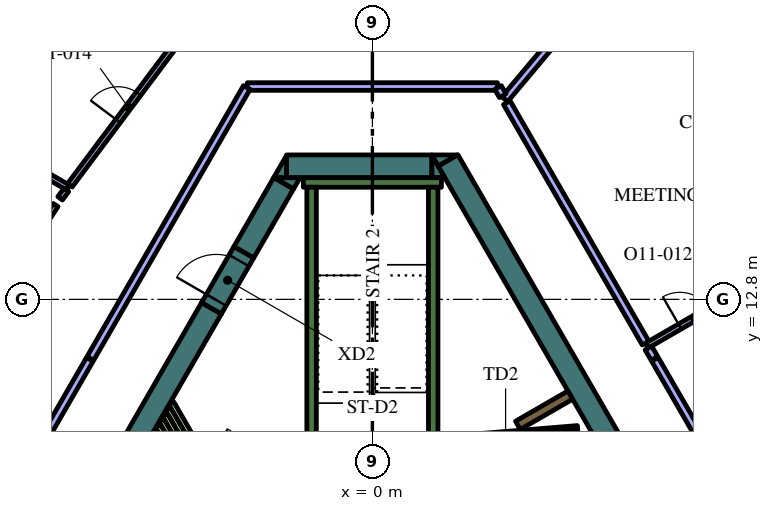
"""IFC4 building model, lengths in metres.
Left out: names, types, materials, properties, quantities, classifications, styles, units other than length and angle.
Written with IfcOpenShell. Run it as: python <this file> out.ifc"""

import sys

from ifc_helpers import new_model, si_unit, direction, frame, frame_2d, origin, place, context, subcontext, project, spatial, polyline, rectangle, outline, extrude, element, fill, save


model = new_model("IFC4")
c1 = context("Model", 3, precision=1e-05, world=origin(), true_north=direction((0.0, 1.0)))
c2 = subcontext(c1, "Body", "Model", "MODEL_VIEW")
j1 = project(units=[si_unit("LENGTHUNIT", "METRE"), si_unit("PLANEANGLEUNIT", "RADIAN")], contexts=[c1])
p1 = place(None, origin())
s1 = spatial("IfcSite", under=j1, at=p1, CompositionType="ELEMENT")
p2 = place(p1, origin())
s2 = spatial("IfcBuilding", under=s1, at=p2, CompositionType="ELEMENT")
p3 = place(p2, frame((0.0, 0.0, 275.4)))
s3 = spatial("IfcBuildingStorey", under=s2, at=p3, CompositionType="ELEMENT", Elevation=275.4)
p4 = place(p3, frame((1.989, 16.456, 0.0), z_axis=(0.0, 0.0, 1.0), x_axis=(0.49999102663, -0.8660305845, 0.0)))
e1 = element("IfcWall", 1, at=p4, inside=s3, PredefinedType="SOLIDWALL", context=c2, shape_type="SweptSolid", body=[
    extrude(rectangle(XDim=12.406, YDim=0.6, at=frame_2d((6.203, 0.0))), origin(), (0.0, 0.0, 1.0), 4.2),
])
p5 = place(p3, origin())
e2 = element("IfcWall", 2, at=p5, inside=s3, PredefinedType="SOLIDWALL", context=c2, shape_type="SweptSolid", body=[
    extrude(outline(polyline([(1.559, 16.6), (2.235, 16.6), (1.728, 16.307), (1.559, 16.6)])), origin(), (0.0, 0.0, 1.0), 4.2),
])
p6 = place(p3, frame((-2.258, 16.3, 0.0), z_axis=(0.0, 0.0, 1.0), x_axis=(1.0, 0.0, 0.0)))
e3 = element("IfcWall", 3, at=p6, inside=s3, PredefinedType="SOLIDWALL", context=c2, shape_type="SweptSolid", body=[
    extrude(rectangle(XDim=3.823, YDim=0.6, at=frame_2d((1.912, 0.0))), origin(), (0.0, 0.0, 1.0), 4.2),
])
e4 = element("IfcWall", 4, at=p5, inside=s3, PredefinedType="SOLIDWALL", context=c2, shape_type="SweptSolid", body=[
    extrude(outline(polyline([(1.905, 16.0), (1.567, 16.0), (1.567, 16.585), (1.905, 16.0)])), origin(), (0.0, 0.0, 1.0), 4.2),
])
e5 = element("IfcWall", 5, at=p5, inside=s3, PredefinedType="SOLIDWALL", context=c2, shape_type="SweptSolid", body=[
    extrude(outline(polyline([(-2.598, 16.0), (-2.26, 16.585), (-2.26, 16.0), (-2.598, 16.0)])), origin(), (0.0, 0.0, 1.0), 4.2),
])
p7 = place(p3, frame((-2.335, 15.855, 0.0), z_axis=(0.0, 0.0, 1.0), x_axis=(-0.499980971027, -0.866036389889, 0.0)))
e6 = element("IfcWall", 6, at=p7, inside=s3, PredefinedType="SOLIDWALL", context=c2, shape_type="SweptSolid", body=[
    extrude(rectangle(XDim=2.098, YDim=0.6, at=frame_2d((1.049, 0.0))), origin(), (0.0, 0.0, 1.0), 4.2),
])
e7 = element("IfcWall", 7, at=p5, inside=s3, PredefinedType="SOLIDWALL", context=c2, shape_type="SweptSolid", body=[
    extrude(outline(polyline([(-1.905, 16.0), (-2.074, 15.707), (-2.581, 16.0), (-1.905, 16.0)])), origin(), (0.0, 0.0, 1.0), 4.2),
])
p8 = place(p3, frame((-4.234, 12.566, 0.0), z_axis=(0.0, 0.0, 1.0), x_axis=(-0.499998841866, -0.866026072432, 0.0)))
e8 = element("IfcWall", 8, at=p8, inside=s3, PredefinedType="SOLIDWALL", context=c2, shape_type="SweptSolid", body=[
    extrude(rectangle(XDim=16.694, YDim=0.6, at=frame_2d((8.347, 0.0))), origin(), (0.0, 0.0, 1.0), 4.2),
])
p9 = place(p3, frame((-1.817, 15.875, 0.0), z_axis=(0.0, 0.0, 1.0), x_axis=(1.0, 0.0, 0.0)))
e9 = element("IfcWall", 9, at=p9, inside=s3, PredefinedType="SOLIDWALL", context=c2, shape_type="SweptSolid", body=[
    extrude(rectangle(XDim=3.634, YDim=0.25, at=frame_2d((1.817, 0.0))), origin(), (0.0, 0.0, 1.0), 4.2),
])
p10 = place(p3, frame((1.6, 8.95, 0.0), z_axis=(0.0, 0.0, 1.0), x_axis=(0.0, 1.0, 0.0)))
e10 = element("IfcWall", 10, at=p10, inside=s3, PredefinedType="SOLIDWALL", context=c2, shape_type="SweptSolid", body=[
    extrude(rectangle(XDim=6.8, YDim=0.25, at=frame_2d((3.4, 0.0))), origin(), (0.0, 0.0, 1.0), 4.2),
])
p11 = place(p3, frame((-1.6, 8.7, 0.0), z_axis=(0.0, 0.0, 1.0), x_axis=(0.0, 1.0, 0.0)))
e11 = element("IfcWall", 11, at=p11, inside=s3, PredefinedType="SOLIDWALL", context=c2, shape_type="SweptSolid", body=[
    extrude(rectangle(XDim=7.05, YDim=0.25, at=frame_2d((3.525, 0.0))), origin(), (0.0, 0.0, 1.0), 4.2),
])
p12 = place(p3, frame((3.83, 9.486, 0.0), z_axis=(0.0, 0.0, 1.0), x_axis=(0.865986202621, 0.500067892261, 0.0)))
e12 = element("IfcWall", 12, at=p12, inside=s3, PredefinedType="SOLIDWALL", context=c2, shape_type="SweptSolid", body=[
    extrude(rectangle(XDim=1.591, YDim=0.25, at=frame_2d((0.795, 0.0))), origin(), (0.0, 0.0, 1.0), 4.2),
])
p13 = place(p3, frame((-5.294, 10.067, 0.0), z_axis=(0.0, 0.0, 1.0), x_axis=(0.500054140411, -0.865994143547, 0.0)))
e13 = element("IfcWall", 13, at=p13, inside=s3, PredefinedType="PARTITIONING", context=c2, shape_type="SweptSolid", body=[
    extrude(rectangle(XDim=1.529, YDim=0.15, at=frame_2d((0.765, 0.0))), origin(), (0.0, 0.0, 1.0), 3.55),
])
p14 = place(p3, frame((-5.381, 9.917, 0.0), z_axis=(0.0, 0.0, 1.0), x_axis=(0.500136970483, -0.865946309396, 0.0)))
e14 = element("IfcWall", 14, at=p14, inside=s3, PredefinedType="PARTITIONING", context=c2, shape_type="SweptSolid", body=[
    extrude(rectangle(XDim=1.359, YDim=0.15, at=frame_2d((0.68, 0.0))), origin(), (0.0, 0.0, 1.0), 3.55),
])
p15 = place(p3, frame((-5.467, 9.767, 0.0), z_axis=(0.0, 0.0, 1.0), x_axis=(0.500168849293, -0.86592789665, 0.0)))
e15 = element("IfcWall", 15, at=p15, inside=s3, PredefinedType="PARTITIONING", context=c2, shape_type="SweptSolid", body=[
    extrude(rectangle(XDim=1.01, YDim=0.15, at=frame_2d((0.505, 0.0))), origin(), (0.0, 0.0, 1.0), 3.55),
])
p16 = place(p3, frame((-5.554, 9.617, 0.0), z_axis=(0.0, 0.0, 1.0), x_axis=(0.500253084543, -0.86587923604, 0.0)))
e16 = element("IfcWall", 16, at=p16, inside=s3, PredefinedType="PARTITIONING", context=c2, shape_type="SweptSolid", body=[
    extrude(rectangle(XDim=0.664, YDim=0.15, at=frame_2d((0.332, 0.0))), origin(), (0.0, 0.0, 1.0), 3.55),
])
p17 = place(p3, frame((-5.64, 9.467, 0.0), z_axis=(0.0, 0.0, 1.0), x_axis=(0.499944387978, -0.86605750902, 0.0)))
e17 = element("IfcWall", 17, at=p17, inside=s3, PredefinedType="PARTITIONING", context=c2, shape_type="SweptSolid", body=[
    extrude(rectangle(XDim=0.317, YDim=0.15, at=frame_2d((0.159, 0.0))), origin(), (0.0, 0.0, 1.0), 3.55),
])
p18 = place(p3, frame((5.398, 9.419, 0.0), z_axis=(0.0, 0.0, 1.0), x_axis=(-0.996653416376, -0.081743303248, 0.0)))
e18 = element("IfcWall", 18, at=p18, inside=s3, PredefinedType="PARTITIONING", context=c2, shape_type="SweptSolid", body=[
    extrude(rectangle(XDim=2.7, YDim=0.12, at=frame_2d((1.35, 0.0))), origin(), (0.0, 0.0, 1.0), 3.55),
])
p19 = place(p18, frame((1.45, 0.0, 0.0)))
e19 = element("IfcOpeningElement", 19, at=p19, cuts=e18, PredefinedType="OPENING", context=c2, shape_type="SweptSolid", body=[
    extrude(rectangle(XDim=0.9, YDim=2.1, at=frame_2d((0.45, 1.05))), frame((0.0, 0.07, 0.0), z_axis=(0.0, -1.0, 0.0), x_axis=(1.0, 0.0, 0.0)), (0.0, 0.0, 1.0), 0.14),
])
p20 = place(p3, frame((-4.234, 12.566, 0.0), z_axis=(0.0, 0.0, 1.0), x_axis=(0.500000056704, 0.866025371046, 0.0)))
e20 = element("IfcWall", 20, at=p20, inside=s3, PredefinedType="SOLIDWALL", context=c2, shape_type="SweptSolid", body=[
    extrude(rectangle(XDim=1.7, YDim=0.6, at=frame_2d((0.85, 0.0))), origin(), (0.0, 0.0, 1.0), 4.2),
])
p21 = place(p20, frame((0.25, 0.0, 0.0)))
e21 = element("IfcOpeningElement", 21, at=p21, cuts=e20, PredefinedType="OPENING", context=c2, shape_type="SweptSolid", body=[
    extrude(rectangle(XDim=1.2, YDim=2.1, at=frame_2d((0.6, 1.05))), frame((0.0, 0.31, 0.0), z_axis=(0.0, -1.0, 0.0), x_axis=(1.0, 0.0, 0.0)), (0.0, 0.0, 1.0), 0.62),
])
p22 = place(p3, frame((7.226, 11.585, 0.0), z_axis=(0.0, 0.0, 1.0), x_axis=(0.866021079084, 0.500007490527, 0.0)))
e22 = element("IfcWall", 22, at=p22, inside=s3, PredefinedType="PARTITIONING", context=c2, shape_type="SweptSolid", body=[
    extrude(rectangle(XDim=2.892, YDim=0.15, at=frame_2d((1.446, 0.0))), origin(), (0.0, 0.0, 1.0), 3.55),
])
p23 = place(p22, frame((1.0, 0.0, 0.0)))
e23 = element("IfcOpeningElement", 23, at=p23, cuts=e22, PredefinedType="OPENING", context=c2, shape_type="SweptSolid", body=[
    extrude(rectangle(XDim=0.9, YDim=2.1, at=frame_2d((0.45, 1.05))), frame((0.0, 0.085, 0.0), z_axis=(0.0, -1.0, 0.0), x_axis=(1.0, 0.0, 0.0)), (0.0, 0.0, 1.0), 0.17),
])
p24 = place(p3, frame((13.436, 0.829, 0.0), z_axis=(0.0, 0.0, 1.0), x_axis=(-0.49999894854, 0.866026010844, 0.0)))
e24 = element("IfcWall", 24, at=p24, inside=s3, PredefinedType="PARTITIONING", context=c2, shape_type="SweptSolid", body=[
    extrude(rectangle(XDim=12.0, YDim=0.2, at=frame_2d((6.0, 0.0))), origin(), (0.0, 0.0, 1.0), 3.55),
])
p25 = place(p24, frame((5.5, 0.0, 0.0)))
e25 = element("IfcOpeningElement", 25, at=p25, cuts=e24, PredefinedType="OPENING", context=c2, shape_type="SweptSolid", body=[
    extrude(rectangle(XDim=1.0, YDim=2.1, at=frame_2d((0.5, 1.05))), frame((0.0, 0.11, 0.0), z_axis=(0.0, -1.0, 0.0), x_axis=(1.0, 0.0, 0.0)), (0.0, 0.0, 1.0), 0.22),
])
p26 = place(p3, frame((7.421, 11.247, 0.0), z_axis=(0.0, 0.0, 1.0), x_axis=(-0.500303403544, 0.865850162789, 0.0)))
e26 = element("IfcWall", 26, at=p26, inside=s3, PredefinedType="PARTITIONING", context=c2, shape_type="SweptSolid", body=[
    extrude(rectangle(XDim=0.315, YDim=0.2, at=frame_2d((0.158, 0.0))), origin(), (0.0, 0.0, 1.0), 3.55),
])
p27 = place(p3, frame((3.483, 18.067, 0.0), z_axis=(0.0, 0.0, 1.0), x_axis=(0.642896944312, 0.765952687177, 0.0)))
e27 = element("IfcWall", 27, at=p27, inside=s3, PredefinedType="PARTITIONING", context=c2, shape_type="SweptSolid", body=[
    extrude(rectangle(XDim=2.29, YDim=0.2, at=frame_2d((1.145, 0.0))), origin(), (0.0, 0.0, 1.0), 3.55),
])
p28 = place(p3, frame((7.188, 11.65, 0.0), z_axis=(0.0, 0.0, 1.0), x_axis=(-0.499989634868, 0.866031388014, 0.0)))
e28 = element("IfcWall", 28, at=p28, inside=s3, PredefinedType="PARTITIONING", context=c2, shape_type="SweptSolid", body=[
    extrude(rectangle(XDim=7.303, YDim=0.2, at=frame_2d((3.652, 0.0))), origin(), (0.0, 0.0, 1.0), 3.55),
])
p29 = place(p3, frame((-8.007, 15.74, 0.0), z_axis=(0.0, 0.0, 1.0), x_axis=(-0.866044607523, 0.499966736674, 0.0)))
e29 = element("IfcWall", 29, at=p29, inside=s3, PredefinedType="PARTITIONING", context=c2, shape_type="SweptSolid", body=[
    extrude(rectangle(XDim=3.115, YDim=0.15, at=frame_2d((1.557, 0.0))), origin(), (0.0, 0.0, 1.0), 3.55),
])
p30 = place(p3, frame((-7.962, 15.8, 0.0), z_axis=(0.0, 0.0, 1.0), x_axis=(0.599528135832, 0.800353680785, 0.0)))
e30 = element("IfcWall", 30, at=p30, inside=s3, PredefinedType="PARTITIONING", context=c2, shape_type="SweptSolid", body=[
    extrude(rectangle(XDim=5.217, YDim=0.15, at=frame_2d((2.608, 0.0))), origin(), (0.0, 0.0, 1.0), 3.55),
])
p31 = place(p30, frame((2.116, 0.0, 0.0)))
e31 = element("IfcOpeningElement", 31, at=p31, cuts=e30, PredefinedType="OPENING", context=c2, shape_type="SweptSolid", body=[
    extrude(rectangle(XDim=0.9, YDim=2.1, at=frame_2d((0.45, 1.05))), frame((0.0, 0.085, 0.0), z_axis=(0.0, -1.0, 0.0), x_axis=(1.0, 0.0, 0.0)), (0.0, 0.0, 1.0), 0.17),
])
p32 = place(p3, frame((-8.052, 15.679, 0.0), z_axis=(0.0, 0.0, 1.0), x_axis=(-0.599004157744, -0.800745914136, 0.0)))
e32 = element("IfcWall", 32, at=p32, inside=s3, PredefinedType="PARTITIONING", context=c2, shape_type="SweptSolid", body=[
    extrude(rectangle(XDim=0.275, YDim=0.15, at=frame_2d((0.137, 0.0))), origin(), (0.0, 0.0, 1.0), 3.55),
])
p33 = place(p3, frame((-11.628, 10.29, 0.0), z_axis=(0.0, 0.0, 1.0), x_axis=(0.55074607557, 0.834672846236, 0.0)))
e33 = element("IfcWall", 33, at=p33, inside=s3, PredefinedType="PARTITIONING", context=c2, shape_type="SweptSolid", body=[
    extrude(rectangle(XDim=5.979, YDim=0.15, at=frame_2d((2.99, 0.0))), origin(), (0.0, 0.0, 1.0), 3.55),
])
p34 = place(p33, frame((2.58, 0.0, 0.0)))
e34 = element("IfcOpeningElement", 34, at=p34, cuts=e33, PredefinedType="OPENING", context=c2, shape_type="SweptSolid", body=[
    extrude(rectangle(XDim=0.9, YDim=2.1, at=frame_2d((0.45, 1.05))), frame((0.0, 0.085, 0.0), z_axis=(0.0, -1.0, 0.0), x_axis=(1.0, 0.0, 0.0)), (0.0, 0.0, 1.0), 0.17),
])
p35 = place(p3, frame((-7.436, 11.221, 0.0), z_axis=(0.0, 0.0, 1.0), x_axis=(-0.49999894854, -0.866026010844, 0.0)))
e35 = element("IfcWall", 35, at=p35, inside=s3, PredefinedType="PARTITIONING", context=c2, shape_type="SweptSolid", body=[
    extrude(rectangle(XDim=12.0, YDim=0.2, at=frame_2d((6.0, 0.0))), origin(), (0.0, 0.0, 1.0), 3.55),
])
p36 = place(p35, frame((5.5, 0.0, 0.0)))
e36 = element("IfcOpeningElement", 36, at=p36, cuts=e35, PredefinedType="OPENING", context=c2, shape_type="SweptSolid", body=[
    extrude(rectangle(XDim=1.0, YDim=2.1, at=frame_2d((0.5, 1.05))), frame((0.0, 0.11, 0.0), z_axis=(0.0, -1.0, 0.0), x_axis=(1.0, 0.0, 0.0)), (0.0, 0.0, 1.0), 0.22),
])
p37 = place(p3, frame((3.291, 18.4, 0.0), z_axis=(0.0, 0.0, 1.0), x_axis=(-1.0, 0.0, 0.0)))
e37 = element("IfcWall", 37, at=p37, inside=s3, PredefinedType="PARTITIONING", context=c2, shape_type="SweptSolid", body=[
    extrude(rectangle(XDim=6.582, YDim=0.2, at=frame_2d((3.291, 0.0))), origin(), (0.0, 0.0, 1.0), 3.55),
])
p38 = place(p3, frame((-3.306, 18.374, 0.0), z_axis=(0.0, 0.0, 1.0), x_axis=(-0.499999798456, -0.866025520146, 0.0)))
e38 = element("IfcWall", 38, at=p38, inside=s3, PredefinedType="PARTITIONING", context=c2, shape_type="SweptSolid", body=[
    extrude(rectangle(XDim=8.229, YDim=0.2, at=frame_2d((4.115, 0.0))), origin(), (0.0, 0.0, 1.0), 3.55),
])
p39 = place(p3, frame((3.43, 18.159, 0.0), z_axis=(0.0, 0.0, 1.0), x_axis=(-0.499949632511, 0.866054481515, 0.0)))
e39 = element("IfcWall", 39, at=p39, inside=s3, PredefinedType="PARTITIONING", context=c2, shape_type="SweptSolid", body=[
    extrude(rectangle(XDim=0.248, YDim=0.2, at=frame_2d((0.124, 0.0))), origin(), (0.0, 0.0, 1.0), 3.55),
])
p40 = place(p3, frame((10.938, 17.99, 0.0), z_axis=(0.0, 0.0, 1.0), x_axis=(-0.599559865294, 0.800329911929, 0.0)))
e40 = element("IfcWall", 40, at=p40, inside=s3, PredefinedType="SOLIDWALL", context=c2, shape_type="SweptSolid", body=[
    extrude(rectangle(XDim=5.415, YDim=0.19, at=frame_2d((2.708, 0.0))), origin(), (0.0, 0.0, 1.0), 3.95),
])
p41 = place(p40, frame((0.358, 0.0, 0.6)))
e41 = element("IfcOpeningElement", 41, at=p41, cuts=e40, PredefinedType="OPENING", context=c2, shape_type="SweptSolid", body=[
    extrude(rectangle(XDim=1.5, YDim=2.85, at=frame_2d((0.75, 1.425))), frame((0.0, 0.105, 0.0), z_axis=(0.0, -1.0, 0.0), x_axis=(1.0, 0.0, 0.0)), (0.0, 0.0, 1.0), 0.21),
])
p42 = place(p40, frame((3.593, 0.0, 0.6)))
e42 = element("IfcOpeningElement", 42, at=p42, cuts=e40, PredefinedType="OPENING", context=c2, shape_type="SweptSolid", body=[
    extrude(rectangle(XDim=1.5, YDim=2.85, at=frame_2d((0.75, 1.425))), frame((0.0, 0.105, 0.0), z_axis=(0.0, -1.0, 0.0), x_axis=(1.0, 0.0, 0.0)), (0.0, 0.0, 1.0), 0.21),
])
p43 = place(p3, frame((-7.692, 22.324, 0.0), z_axis=(0.0, 0.0, 1.0), x_axis=(-0.599559865294, -0.800329911929, 0.0)))
e43 = element("IfcWall", 43, at=p43, inside=s3, PredefinedType="SOLIDWALL", context=c2, shape_type="SweptSolid", body=[
    extrude(rectangle(XDim=5.415, YDim=0.19, at=frame_2d((2.708, 0.0))), origin(), (0.0, 0.0, 1.0), 3.95),
])
p44 = place(p43, frame((0.323, 0.0, 0.6)))
e44 = element("IfcOpeningElement", 44, at=p44, cuts=e43, PredefinedType="OPENING", context=c2, shape_type="SweptSolid", body=[
    extrude(rectangle(XDim=1.5, YDim=2.85, at=frame_2d((0.75, 1.425))), frame((0.0, 0.105, 0.0), z_axis=(0.0, -1.0, 0.0), x_axis=(1.0, 0.0, 0.0)), (0.0, 0.0, 1.0), 0.21),
])
p45 = place(p43, frame((3.558, 0.0, 0.6)))
e45 = element("IfcOpeningElement", 45, at=p45, cuts=e43, PredefinedType="OPENING", context=c2, shape_type="SweptSolid", body=[
    extrude(rectangle(XDim=1.5, YDim=2.85, at=frame_2d((0.75, 1.425))), frame((0.0, 0.105, 0.0), z_axis=(0.0, -1.0, 0.0), x_axis=(1.0, 0.0, 0.0)), (0.0, 0.0, 1.0), 0.21),
])
p46 = place(p19, origin())
e46 = element("IfcDoor", 46, at=p46, inside=s3, OperationType="SINGLE_SWING_LEFT", PredefinedType="DOOR", context=c2, shape_type="SweptSolid", body=[
    extrude(rectangle(XDim=0.9, YDim=2.1, at=frame_2d((0.45, 1.05))), frame((0.0, 0.025, 0.0), z_axis=(0.0, -1.0, 0.0), x_axis=(1.0, 0.0, 0.0)), (0.0, 0.0, 1.0), 0.05),
])
fill(e19, e46)
p47 = place(p21, origin())
e47 = element("IfcDoor", 47, at=p47, inside=s3, OperationType="SINGLE_SWING_LEFT", PredefinedType="DOOR", context=c2, shape_type="SweptSolid", body=[
    extrude(rectangle(XDim=1.2, YDim=2.1, at=frame_2d((0.6, 1.05))), frame((0.0, 0.025, 0.0), z_axis=(0.0, -1.0, 0.0), x_axis=(1.0, 0.0, 0.0)), (0.0, 0.0, 1.0), 0.05),
])
fill(e21, e47)
p48 = place(p23, origin())
e48 = element("IfcDoor", 48, at=p48, inside=s3, OperationType="SINGLE_SWING_RIGHT", PredefinedType="DOOR", context=c2, shape_type="SweptSolid", body=[
    extrude(rectangle(XDim=0.9, YDim=2.1, at=frame_2d((0.45, 1.05))), frame((0.0, 0.025, 0.0), z_axis=(0.0, -1.0, 0.0), x_axis=(1.0, 0.0, 0.0)), (0.0, 0.0, 1.0), 0.05),
])
fill(e23, e48)
p49 = place(p31, origin())
e49 = element("IfcDoor", 49, at=p49, inside=s3, OperationType="SINGLE_SWING_LEFT", PredefinedType="DOOR", context=c2, shape_type="SweptSolid", body=[
    extrude(rectangle(XDim=0.9, YDim=2.1, at=frame_2d((0.45, 1.05))), frame((0.0, 0.025, 0.0), z_axis=(0.0, -1.0, 0.0), x_axis=(1.0, 0.0, 0.0)), (0.0, 0.0, 1.0), 0.05),
])
fill(e31, e49)
save(model, sys.argv[1])
